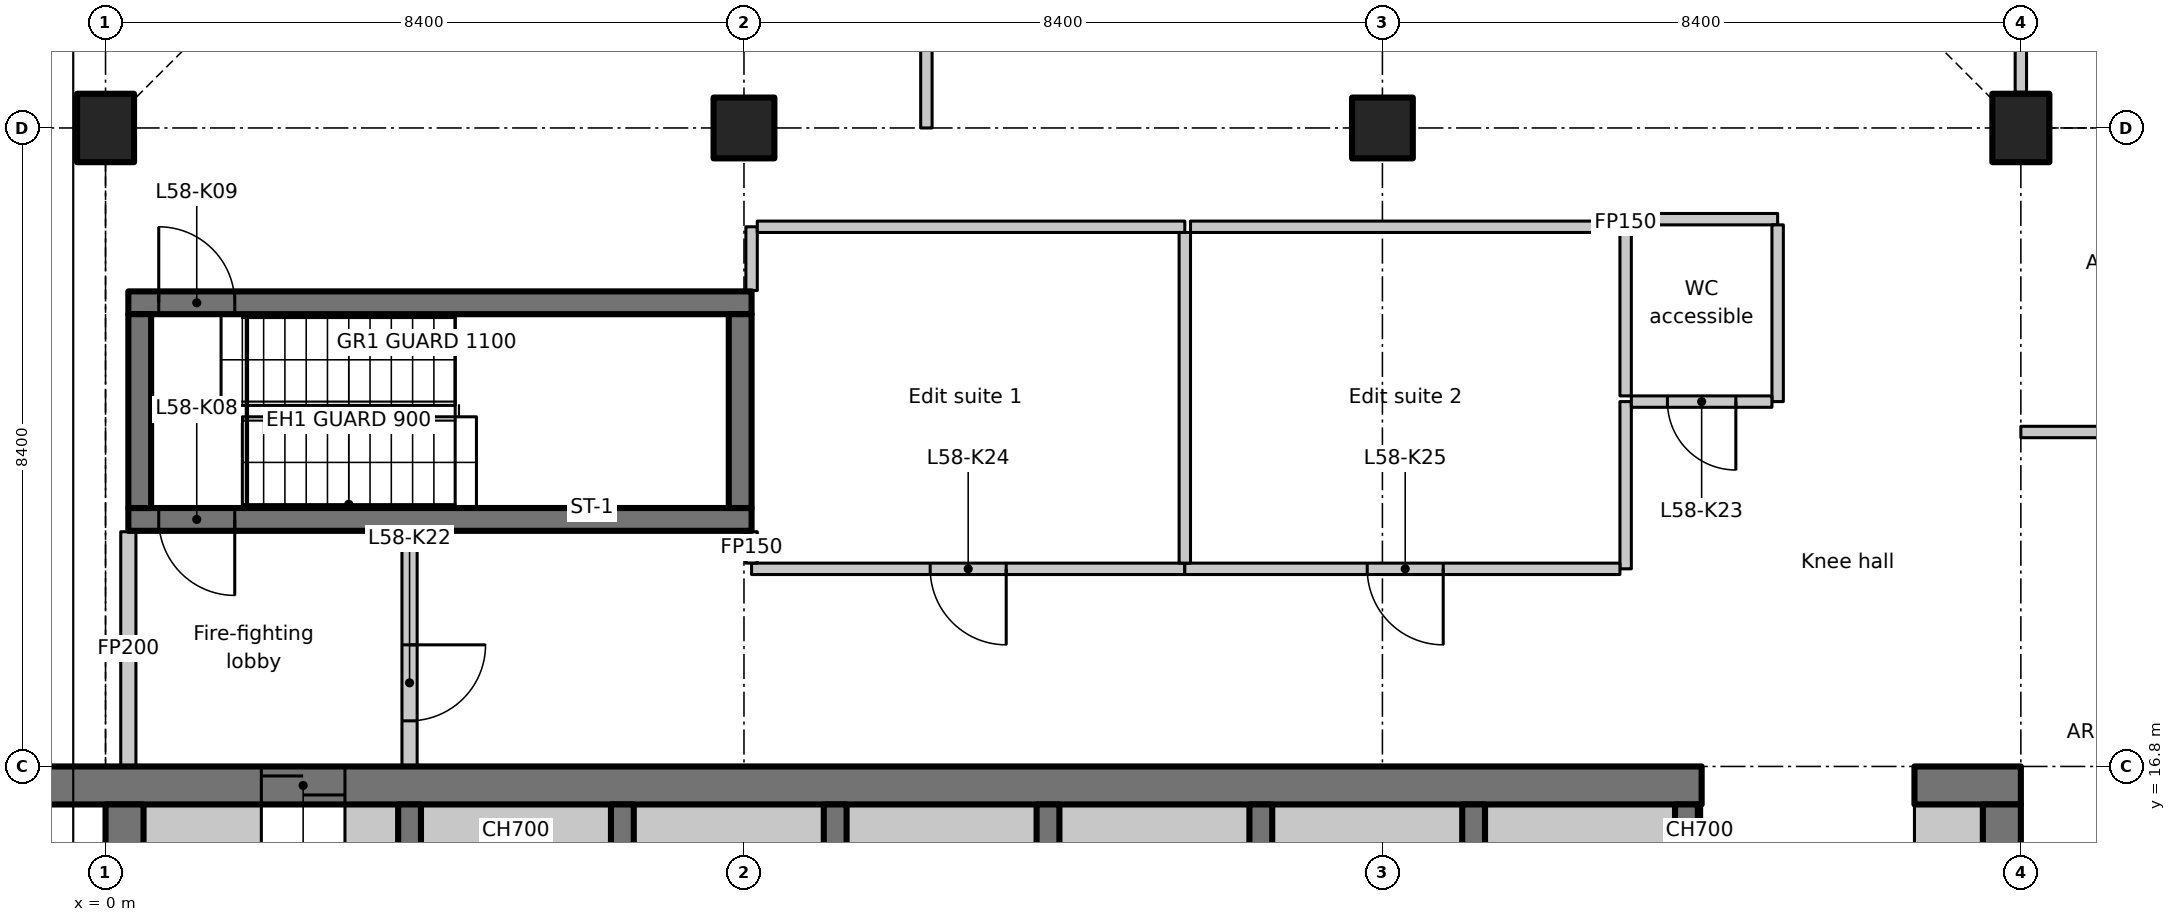
"""IFC4 building model, lengths in metres.
Left out: names, types, materials, properties, quantities, classifications, styles, units other than length and angle.
Written with IfcOpenShell. Run it as: python <this file> out.ifc"""

import sys

from ifc_helpers import new_model, si_unit, direction, frame, frame_2d, origin, origin_2d, place, context, subcontext, project, spatial, rectangle, extrude, element, fill, save


model = new_model("IFC4")
c1 = context("Model", 3, precision=1e-05, world=origin(), true_north=direction((0.0, 1.0)))
c2 = subcontext(c1, "Body", "Model", "MODEL_VIEW")
j1 = project(units=[si_unit("LENGTHUNIT", "METRE"), si_unit("PLANEANGLEUNIT", "RADIAN")], contexts=[c1])
p1 = place(None, origin())
s1 = spatial("IfcSite", under=j1, at=p1, CompositionType="ELEMENT")
p2 = place(p1, origin())
s2 = spatial("IfcBuilding", under=s1, at=p2, CompositionType="ELEMENT")
p3 = place(p2, frame((0.0, 0.0, 230.1)))
s3 = spatial("IfcBuildingStorey", under=s2, at=p3, CompositionType="ELEMENT", Elevation=230.1)
p4 = place(p3, frame((0.0, 25.2, 0.0), z_axis=(0.0, 0.0, 1.0), x_axis=(1.0, 0.0, 0.0)))
e1 = element("IfcColumn", 1, at=p4, inside=s3, PredefinedType="COLUMN", context=c2, shape_type="SweptSolid", body=[
    extrude(rectangle(XDim=0.75, YDim=0.9, at=origin_2d()), origin(), (0.0, 0.0, 1.0), 3.35),
])
for number, where, z_axis, x_axis in (
    (2, (8.4, 25.2, 0.0), (0.0, 0.0, 1.0), (1.0, 0.0, 0.0)),
    (3, (16.8, 25.2, 0.0), (0.0, 0.0, 1.0), (1.0, 0.0, 0.0)),
):
    element("IfcColumn", number, at=place(p3, frame(where, z_axis=z_axis, x_axis=x_axis)), inside=s3, PredefinedType="COLUMN", context=c2, shape_type="SweptSolid", body=[
        extrude(rectangle(XDim=0.8, YDim=0.8, at=origin_2d()), origin(), (0.0, 0.0, 1.0), 3.35),
    ])
p5 = place(p3, frame((25.2, 25.2, 0.0), z_axis=(0.0, 0.0, 1.0), x_axis=(1.0, 0.0, 0.0)))
e4 = element("IfcColumn", 4, at=p5, inside=s3, PredefinedType="COLUMN", context=c2, shape_type="SweptSolid", body=[
    extrude(rectangle(XDim=0.75, YDim=0.9, at=origin_2d()), origin(), (0.0, 0.0, 1.0), 3.35),
])
p6 = place(p3, frame((-1.1, 16.55, 0.0), z_axis=(0.0, 0.0, 1.0), x_axis=(1.0, 0.0, 0.0)))
e5 = element("IfcWall", 5, at=p6, inside=s3, PredefinedType="SHEAR", context=c2, shape_type="SweptSolid", body=[
    extrude(rectangle(XDim=22.1, YDim=0.5, at=frame_2d((11.05, 0.0))), origin(), (0.0, 0.0, 1.0), 3.35),
])
p7 = place(p6, frame((3.15, 0.0, 0.0)))
e6 = element("IfcOpeningElement", 6, at=p7, cuts=e5, PredefinedType="OPENING", context=c2, shape_type="SweptSolid", body=[
    extrude(rectangle(XDim=1.1, YDim=2.3, at=frame_2d((0.55, 1.15))), frame((0.0, 0.26, 0.0), z_axis=(0.0, -1.0, 0.0), x_axis=(1.0, 0.0, 0.0)), (0.0, 0.0, 1.0), 0.52),
])
p8 = place(p3, frame((23.8, 16.55, 0.0), z_axis=(0.0, 0.0, 1.0), x_axis=(1.0, 0.0, 0.0)))
e7 = element("IfcWall", 7, at=p8, inside=s3, PredefinedType="SHEAR", context=c2, shape_type="SweptSolid", body=[
    extrude(rectangle(XDim=1.4, YDim=0.5, at=frame_2d((0.7, 0.0))), origin(), (0.0, 0.0, 1.0), 3.35),
])
p9 = place(p3, frame((0.25, 7.436, 0.0), z_axis=(0.0, 0.0, 1.0), x_axis=(0.0, 1.0, 0.0)))
e8 = element("IfcWall", 8, at=p9, inside=s3, PredefinedType="SHEAR", context=c2, shape_type="SweptSolid", body=[
    extrude(rectangle(XDim=8.864, YDim=0.5, at=frame_2d((4.432, 0.0))), origin(), (0.0, 0.0, 1.0), 3.35),
])
p10 = place(p3, frame((24.95, 12.6, 0.0), z_axis=(0.0, 0.0, 1.0), x_axis=(0.0, 1.0, 0.0)))
e9 = element("IfcWall", 9, at=p10, inside=s3, PredefinedType="SHEAR", context=c2, shape_type="SweptSolid", body=[
    extrude(rectangle(XDim=3.7, YDim=0.5, at=frame_2d((1.85, 0.0))), origin(), (0.0, 0.0, 1.0), 3.35),
])
p11 = place(p3, frame((0.5, 15.95, 0.0), z_axis=(0.0, 0.0, 1.0), x_axis=(1.0, 0.0, 0.0)))
e10 = element("IfcWall", 10, at=p11, inside=s3, PredefinedType="PARTITIONING", context=c2, shape_type="SweptSolid", body=[
    extrude(rectangle(XDim=1.55, YDim=0.7, at=frame_2d((0.775, 0.0))), origin(), (0.0, 0.0, 1.0), 3.35),
])
p12 = place(p3, frame((23.8, 15.95, 0.0), z_axis=(0.0, 0.0, 1.0), x_axis=(1.0, 0.0, 0.0)))
e11 = element("IfcWall", 11, at=p12, inside=s3, PredefinedType="PARTITIONING", context=c2, shape_type="SweptSolid", body=[
    extrude(rectangle(XDim=0.9, YDim=0.7, at=frame_2d((0.45, 0.0))), origin(), (0.0, 0.0, 1.0), 3.35),
])
for number, where, z_axis, x_axis in (
    (12, (4.0, 12.95, 0.0), (0.0, 0.0, 1.0), (0.0, 1.0, 0.0)),
    (13, (6.8, 12.95, 0.0), (0.0, 0.0, 1.0), (0.0, 1.0, 0.0)),
    (14, (9.6, 12.95, 0.0), (0.0, 0.0, 1.0), (0.0, 1.0, 0.0)),
    (15, (12.4, 12.95, 0.0), (0.0, 0.0, 1.0), (0.0, 1.0, 0.0)),
    (16, (15.2, 12.95, 0.0), (0.0, 0.0, 1.0), (0.0, 1.0, 0.0)),
    (17, (18.0, 12.95, 0.0), (0.0, 0.0, 1.0), (0.0, 1.0, 0.0)),
    (18, (20.8, 12.95, 0.0), (0.0, 0.0, 1.0), (0.0, 1.0, 0.0)),
):
    element("IfcWall", number, at=place(p3, frame(where, z_axis=z_axis, x_axis=x_axis)), inside=s3, PredefinedType="SHEAR", context=c2, shape_type="SweptSolid", body=[
        extrude(rectangle(XDim=3.35, YDim=0.3, at=frame_2d((1.675, 0.0))), origin(), (0.0, 0.0, 1.0), 3.35),
    ])
p13 = place(p3, frame((8.5, 20.05, 0.0), z_axis=(0.0, 0.0, 1.0), x_axis=(-1.0, 0.0, 0.0)))
e19 = element("IfcWall", 19, at=p13, inside=s3, PredefinedType="SHEAR", context=c2, shape_type="SweptSolid", body=[
    extrude(rectangle(XDim=8.2, YDim=0.3, at=frame_2d((4.1, 0.0))), origin(), (0.0, 0.0, 1.0), 3.35),
])
p14 = place(p13, frame((6.8, 0.0, 0.0)))
e20 = element("IfcOpeningElement", 20, at=p14, cuts=e19, PredefinedType="OPENING", context=c2, shape_type="SweptSolid", body=[
    extrude(rectangle(XDim=1.0, YDim=2.1, at=frame_2d((0.5, 1.05))), frame((0.0, 0.16, 0.0), z_axis=(0.0, -1.0, 0.0), x_axis=(1.0, 0.0, 0.0)), (0.0, 0.0, 1.0), 0.32),
])
p15 = place(p3, frame((0.3, 22.9, 0.0), z_axis=(0.0, 0.0, 1.0), x_axis=(1.0, 0.0, 0.0)))
e21 = element("IfcWall", 21, at=p15, inside=s3, PredefinedType="SHEAR", context=c2, shape_type="SweptSolid", body=[
    extrude(rectangle(XDim=8.2, YDim=0.3, at=frame_2d((4.1, 0.0))), origin(), (0.0, 0.0, 1.0), 3.35),
])
p16 = place(p15, frame((0.4, 0.0, 0.0)))
e22 = element("IfcOpeningElement", 22, at=p16, cuts=e21, PredefinedType="OPENING", context=c2, shape_type="SweptSolid", body=[
    extrude(rectangle(XDim=1.0, YDim=2.1, at=frame_2d((0.5, 1.05))), frame((0.0, 0.16, 0.0), z_axis=(0.0, -1.0, 0.0), x_axis=(1.0, 0.0, 0.0)), (0.0, 0.0, 1.0), 0.32),
])
for number, where, z_axis, x_axis in (
    (23, (0.45, 20.2, 0.0), (0.0, 0.0, 1.0), (0.0, 1.0, 0.0)),
    (24, (8.35, 20.2, 0.0), (0.0, 0.0, 1.0), (0.0, 1.0, 0.0)),
):
    element("IfcWall", number, at=place(p3, frame(where, z_axis=z_axis, x_axis=x_axis)), inside=s3, PredefinedType="SHEAR", context=c2, shape_type="SweptSolid", body=[
        extrude(rectangle(XDim=2.55, YDim=0.3, at=frame_2d((1.275, 0.0))), origin(), (0.0, 0.0, 1.0), 3.35),
    ])
p17 = place(p3, frame((0.3, 16.812, 0.0), z_axis=(0.0, 0.0, 1.0), x_axis=(0.0, 1.0, 0.0)))
e25 = element("IfcWall", 25, at=p17, inside=s3, PredefinedType="PARTITIONING", context=c2, shape_type="SweptSolid", body=[
    extrude(rectangle(XDim=3.076, YDim=0.2, at=frame_2d((1.538, 0.0))), origin(), (0.0, 0.0, 1.0), 2.98),
])
p18 = place(p3, frame((4.0, 19.888, 0.0), z_axis=(0.0, 0.0, 1.0), x_axis=(0.0, -1.0, 0.0)))
e26 = element("IfcWall", 26, at=p18, inside=s3, PredefinedType="PARTITIONING", context=c2, shape_type="SweptSolid", body=[
    extrude(rectangle(XDim=3.076, YDim=0.2, at=frame_2d((1.538, 0.0))), origin(), (0.0, 0.0, 1.0), 3.35),
])
p19 = place(p18, frame((1.488, 0.0, 0.0)))
e27 = element("IfcOpeningElement", 27, at=p19, cuts=e26, PredefinedType="OPENING", context=c2, shape_type="SweptSolid", body=[
    extrude(rectangle(XDim=1.0, YDim=2.1, at=frame_2d((0.5, 1.05))), frame((0.0, 0.11, 0.0), z_axis=(0.0, -1.0, 0.0), x_axis=(1.0, 0.0, 0.0)), (0.0, 0.0, 1.0), 0.22),
])
p20 = place(p3, frame((14.2, 19.4, 0.0), z_axis=(0.0, 0.0, 1.0), x_axis=(-1.0, 0.0, 0.0)))
e28 = element("IfcWall", 28, at=p20, inside=s3, PredefinedType="PARTITIONING", context=c2, shape_type="SweptSolid", body=[
    extrude(rectangle(XDim=5.7, YDim=0.15, at=frame_2d((2.85, 0.0))), origin(), (0.0, 0.0, 1.0), 3.35),
])
p21 = place(p20, frame((2.35, 0.0, 0.0)))
e29 = element("IfcOpeningElement", 29, at=p21, cuts=e28, PredefinedType="OPENING", context=c2, shape_type="SweptSolid", body=[
    extrude(rectangle(XDim=1.0, YDim=2.1, at=frame_2d((0.5, 1.05))), frame((0.0, 0.085, 0.0), z_axis=(0.0, -1.0, 0.0), x_axis=(1.0, 0.0, 0.0)), (0.0, 0.0, 1.0), 0.17),
])
p22 = place(p3, frame((8.5, 19.475, 0.0), z_axis=(0.0, 0.0, 1.0), x_axis=(0.0, 1.0, 0.0)))
e30 = element("IfcWall", 30, at=p22, inside=s3, PredefinedType="PARTITIONING", context=c2, shape_type="SweptSolid", body=[
    extrude(rectangle(XDim=0.413, YDim=0.15, at=frame_2d((0.207, 0.0))), origin(), (0.0, 0.0, 1.0), 3.35),
])
p23 = place(p3, frame((8.5, 23.062, 0.0), z_axis=(0.0, 0.0, 1.0), x_axis=(0.0, 1.0, 0.0)))
e31 = element("IfcWall", 31, at=p23, inside=s3, PredefinedType="PARTITIONING", context=c2, shape_type="SweptSolid", body=[
    extrude(rectangle(XDim=0.838, YDim=0.15, at=frame_2d((0.419, 0.0))), origin(), (0.0, 0.0, 1.0), 3.35),
])
p24 = place(p3, frame((8.575, 23.9, 0.0), z_axis=(0.0, 0.0, 1.0), x_axis=(1.0, 0.0, 0.0)))
e32 = element("IfcWall", 32, at=p24, inside=s3, PredefinedType="PARTITIONING", context=c2, shape_type="SweptSolid", body=[
    extrude(rectangle(XDim=5.625, YDim=0.15, at=frame_2d((2.812, 0.0))), origin(), (0.0, 0.0, 1.0), 3.35),
])
p25 = place(p3, frame((20.0, 21.6, 0.0), z_axis=(0.0, 0.0, 1.0), x_axis=(0.0, -1.0, 0.0)))
e33 = element("IfcWall", 33, at=p25, inside=s3, PredefinedType="PARTITIONING", context=c2, shape_type="SweptSolid", body=[
    extrude(rectangle(XDim=2.2, YDim=0.15, at=frame_2d((1.1, 0.0))), origin(), (0.0, 0.0, 1.0), 3.35),
])
p26 = place(p3, frame((19.925, 19.4, 0.0), z_axis=(0.0, 0.0, 1.0), x_axis=(-1.0, 0.0, 0.0)))
e34 = element("IfcWall", 34, at=p26, inside=s3, PredefinedType="PARTITIONING", context=c2, shape_type="SweptSolid", body=[
    extrude(rectangle(XDim=5.725, YDim=0.15, at=frame_2d((2.863, 0.0))), origin(), (0.0, 0.0, 1.0), 3.35),
])
p27 = place(p26, frame((2.325, 0.0, 0.0)))
e35 = element("IfcOpeningElement", 35, at=p27, cuts=e34, PredefinedType="OPENING", context=c2, shape_type="SweptSolid", body=[
    extrude(rectangle(XDim=1.0, YDim=2.1, at=frame_2d((0.5, 1.05))), frame((0.0, 0.085, 0.0), z_axis=(0.0, -1.0, 0.0), x_axis=(1.0, 0.0, 0.0)), (0.0, 0.0, 1.0), 0.17),
])
p28 = place(p3, frame((14.2, 23.825, 0.0), z_axis=(0.0, 0.0, 1.0), x_axis=(0.0, -1.0, 0.0)))
e36 = element("IfcWall", 36, at=p28, inside=s3, PredefinedType="PARTITIONING", context=c2, shape_type="SweptSolid", body=[
    extrude(rectangle(XDim=4.35, YDim=0.15, at=frame_2d((2.175, 0.0))), origin(), (0.0, 0.0, 1.0), 3.35),
])
p29 = place(p3, frame((14.275, 23.9, 0.0), z_axis=(0.0, 0.0, 1.0), x_axis=(1.0, 0.0, 0.0)))
e37 = element("IfcWall", 37, at=p29, inside=s3, PredefinedType="PARTITIONING", context=c2, shape_type="SweptSolid", body=[
    extrude(rectangle(XDim=5.725, YDim=0.15, at=frame_2d((2.863, 0.0))), origin(), (0.0, 0.0, 1.0), 3.35),
])
p30 = place(p3, frame((20.0, 23.9, 0.0), z_axis=(0.0, 0.0, 1.0), x_axis=(0.0, 1.0, 0.0)))
e38 = element("IfcWall", 38, at=p30, inside=s3, PredefinedType="PARTITIONING", context=c2, shape_type="SweptSolid", body=[
    extrude(rectangle(XDim=0.1, YDim=0.15, at=frame_2d((0.05, 0.0))), origin(), (0.0, 0.0, 1.0), 3.35),
])
p31 = place(p3, frame((20.075, 24.0, 0.0), z_axis=(0.0, 0.0, 1.0), x_axis=(1.0, 0.0, 0.0)))
e39 = element("IfcWall", 39, at=p31, inside=s3, PredefinedType="PARTITIONING", context=c2, shape_type="SweptSolid", body=[
    extrude(rectangle(XDim=1.925, YDim=0.15, at=frame_2d((0.962, 0.0))), origin(), (0.0, 0.0, 1.0), 3.35),
])
p32 = place(p3, frame((22.0, 23.925, 0.0), z_axis=(0.0, 0.0, 1.0), x_axis=(0.0, -1.0, 0.0)))
e40 = element("IfcWall", 40, at=p32, inside=s3, PredefinedType="PARTITIONING", context=c2, shape_type="SweptSolid", body=[
    extrude(rectangle(XDim=2.325, YDim=0.15, at=frame_2d((1.163, 0.0))), origin(), (0.0, 0.0, 1.0), 3.35),
])
p33 = place(p3, frame((21.925, 21.6, 0.0), z_axis=(0.0, 0.0, 1.0), x_axis=(-1.0, 0.0, 0.0)))
e41 = element("IfcWall", 41, at=p33, inside=s3, PredefinedType="PARTITIONING", context=c2, shape_type="SweptSolid", body=[
    extrude(rectangle(XDim=1.85, YDim=0.15, at=frame_2d((0.925, 0.0))), origin(), (0.0, 0.0, 1.0), 3.35),
])
p34 = place(p33, frame((0.475, 0.0, 0.0)))
e42 = element("IfcOpeningElement", 42, at=p34, cuts=e41, PredefinedType="OPENING", context=c2, shape_type="SweptSolid", body=[
    extrude(rectangle(XDim=0.9, YDim=2.1, at=frame_2d((0.45, 1.05))), frame((0.0, 0.085, 0.0), z_axis=(0.0, -1.0, 0.0), x_axis=(1.0, 0.0, 0.0)), (0.0, 0.0, 1.0), 0.17),
])
p35 = place(p3, frame((20.0, 21.675, 0.0), z_axis=(0.0, 0.0, 1.0), x_axis=(0.0, 1.0, 0.0)))
e43 = element("IfcWall", 43, at=p35, inside=s3, PredefinedType="PARTITIONING", context=c2, shape_type="SweptSolid", body=[
    extrude(rectangle(XDim=2.15, YDim=0.15, at=frame_2d((1.075, 0.0))), origin(), (0.0, 0.0, 1.0), 3.35),
])
p36 = place(p3, frame((3.15, 15.95, 0.0), z_axis=(0.0, 0.0, 1.0), x_axis=(1.0, 0.0, 0.0)))
e44 = element("IfcWall", 44, at=p36, inside=s3, PredefinedType="PARTITIONING", context=c2, shape_type="SweptSolid", body=[
    extrude(rectangle(XDim=0.7, YDim=0.7, at=frame_2d((0.35, 0.0))), origin(), (0.0, 0.0, 1.0), 3.35),
])
for number, where, z_axis, x_axis in (
    (45, (4.15, 15.95, 0.0), (0.0, 0.0, 1.0), (1.0, 0.0, 0.0)),
    (46, (6.95, 15.95, 0.0), (0.0, 0.0, 1.0), (1.0, 0.0, 0.0)),
    (47, (9.75, 15.95, 0.0), (0.0, 0.0, 1.0), (1.0, 0.0, 0.0)),
    (48, (12.55, 15.95, 0.0), (0.0, 0.0, 1.0), (1.0, 0.0, 0.0)),
    (49, (15.35, 15.95, 0.0), (0.0, 0.0, 1.0), (1.0, 0.0, 0.0)),
    (50, (18.15, 15.95, 0.0), (0.0, 0.0, 1.0), (1.0, 0.0, 0.0)),
):
    element("IfcWall", number, at=place(p3, frame(where, z_axis=z_axis, x_axis=x_axis)), inside=s3, PredefinedType="PARTITIONING", context=c2, shape_type="SweptSolid", body=[
        extrude(rectangle(XDim=2.5, YDim=0.7, at=frame_2d((1.25, 0.0))), origin(), (0.0, 0.0, 1.0), 3.35),
    ])
p37 = place(p3, frame((20.95, 15.95, 0.0), z_axis=(0.0, 0.0, 1.0), x_axis=(1.0, 0.0, 0.0)))
e51 = element("IfcWall", 51, at=p37, inside=s3, PredefinedType="PARTITIONING", context=c2, shape_type="SweptSolid", body=[
    extrude(rectangle(XDim=0.05, YDim=0.7, at=frame_2d((0.025, 0.0))), origin(), (0.0, 0.0, 1.0), 3.35),
])
p38 = place(p3, frame((25.2, 21.2, 0.0), z_axis=(0.0, 0.0, 1.0), x_axis=(1.0, 0.0, 0.0)))
e52 = element("IfcWall", 52, at=p38, inside=s3, PredefinedType="PARTITIONING", context=c2, shape_type="SweptSolid", body=[
    extrude(rectangle(XDim=4.2, YDim=0.15, at=frame_2d((2.1, 0.0))), origin(), (0.0, 0.0, 1.0), 3.33),
])
p39 = place(p38, frame((1.5, 0.0, 0.0)))
e53 = element("IfcOpeningElement", 53, at=p39, cuts=e52, PredefinedType="OPENING", context=c2, shape_type="SweptSolid", body=[
    extrude(rectangle(XDim=1.0, YDim=2.1, at=frame_2d((0.5, 1.05))), frame((0.0, 0.085, 0.0), z_axis=(0.0, -1.0, 0.0), x_axis=(1.0, 0.0, 0.0)), (0.0, 0.0, 1.0), 0.17),
])
p40 = place(p3, frame((25.2, 25.67, 0.0), z_axis=(0.0, 0.0, 1.0), x_axis=(0.0, 1.0, 0.0)))
e54 = element("IfcWall", 54, at=p40, inside=s3, PredefinedType="PARTITIONING", context=c2, shape_type="SweptSolid", body=[
    extrude(rectangle(XDim=3.93, YDim=0.15, at=frame_2d((1.965, 0.0))), origin(), (0.0, 0.0, 1.0), 2.98),
])
p41 = place(p3, frame((10.8, 25.2, 0.0), z_axis=(0.0, 0.0, 1.0), x_axis=(0.0, 1.0, 0.0)))
e55 = element("IfcWall", 55, at=p41, inside=s3, PredefinedType="PARTITIONING", context=c2, shape_type="SweptSolid", body=[
    extrude(rectangle(XDim=4.2, YDim=0.15, at=frame_2d((2.1, 0.0))), origin(), (0.0, 0.0, 1.0), 3.33),
])
p42 = place(p41, frame((1.5, 0.0, 0.0)))
e56 = element("IfcOpeningElement", 56, at=p42, cuts=e55, PredefinedType="OPENING", context=c2, shape_type="SweptSolid", body=[
    extrude(rectangle(XDim=1.1, YDim=2.1, at=frame_2d((0.55, 1.05))), frame((0.0, 0.085, 0.0), z_axis=(0.0, -1.0, 0.0), x_axis=(1.0, 0.0, 0.0)), (0.0, 0.0, 1.0), 0.17),
])
p43 = place(p7, origin())
e57 = element("IfcDoor", 57, at=p43, inside=s3, OperationType="SLIDING_TO_LEFT", PredefinedType="DOOR", context=c2, shape_type="SweptSolid", body=[
    extrude(rectangle(XDim=1.1, YDim=2.3, at=frame_2d((0.55, 1.15))), frame((0.0, 0.025, 0.0), z_axis=(0.0, -1.0, 0.0), x_axis=(1.0, 0.0, 0.0)), (0.0, 0.0, 1.0), 0.05),
])
fill(e6, e57)
p44 = place(p14, origin())
e58 = element("IfcDoor", 58, at=p44, inside=s3, OperationType="SINGLE_SWING_LEFT", PredefinedType="DOOR", context=c2, shape_type="SweptSolid", body=[
    extrude(rectangle(XDim=1.0, YDim=2.1, at=frame_2d((0.5, 1.05))), frame((0.0, 0.025, 0.0), z_axis=(0.0, -1.0, 0.0), x_axis=(1.0, 0.0, 0.0)), (0.0, 0.0, 1.0), 0.05),
])
fill(e20, e58)
p45 = place(p16, origin())
e59 = element("IfcDoor", 59, at=p45, inside=s3, OperationType="SINGLE_SWING_RIGHT", PredefinedType="DOOR", context=c2, shape_type="SweptSolid", body=[
    extrude(rectangle(XDim=1.0, YDim=2.1, at=frame_2d((0.5, 1.05))), frame((0.0, 0.025, 0.0), z_axis=(0.0, -1.0, 0.0), x_axis=(1.0, 0.0, 0.0)), (0.0, 0.0, 1.0), 0.05),
])
fill(e22, e59)
p46 = place(p19, origin())
e60 = element("IfcDoor", 60, at=p46, inside=s3, OperationType="SINGLE_SWING_LEFT", PredefinedType="DOOR", context=c2, shape_type="SweptSolid", body=[
    extrude(rectangle(XDim=1.0, YDim=2.1, at=frame_2d((0.5, 1.05))), frame((0.0, 0.025, 0.0), z_axis=(0.0, -1.0, 0.0), x_axis=(1.0, 0.0, 0.0)), (0.0, 0.0, 1.0), 0.05),
])
fill(e27, e60)
p47 = place(p34, origin())
e61 = element("IfcDoor", 61, at=p47, inside=s3, OperationType="SINGLE_SWING_RIGHT", PredefinedType="DOOR", context=c2, shape_type="SweptSolid", body=[
    extrude(rectangle(XDim=0.9, YDim=2.1, at=frame_2d((0.45, 1.05))), frame((0.0, 0.025, 0.0), z_axis=(0.0, -1.0, 0.0), x_axis=(1.0, 0.0, 0.0)), (0.0, 0.0, 1.0), 0.05),
])
fill(e42, e61)
p48 = place(p21, origin())
e62 = element("IfcDoor", 62, at=p48, inside=s3, OperationType="SINGLE_SWING_LEFT", PredefinedType="DOOR", context=c2, shape_type="SweptSolid", body=[
    extrude(rectangle(XDim=1.0, YDim=2.1, at=frame_2d((0.5, 1.05))), frame((0.0, 0.025, 0.0), z_axis=(0.0, -1.0, 0.0), x_axis=(1.0, 0.0, 0.0)), (0.0, 0.0, 1.0), 0.05),
])
fill(e29, e62)
p49 = place(p27, origin())
e63 = element("IfcDoor", 63, at=p49, inside=s3, OperationType="SINGLE_SWING_RIGHT", PredefinedType="DOOR", context=c2, shape_type="SweptSolid", body=[
    extrude(rectangle(XDim=1.0, YDim=2.1, at=frame_2d((0.5, 1.05))), frame((0.0, 0.025, 0.0), z_axis=(0.0, -1.0, 0.0), x_axis=(1.0, 0.0, 0.0)), (0.0, 0.0, 1.0), 0.05),
])
fill(e35, e63)
save(model, sys.argv[1])
